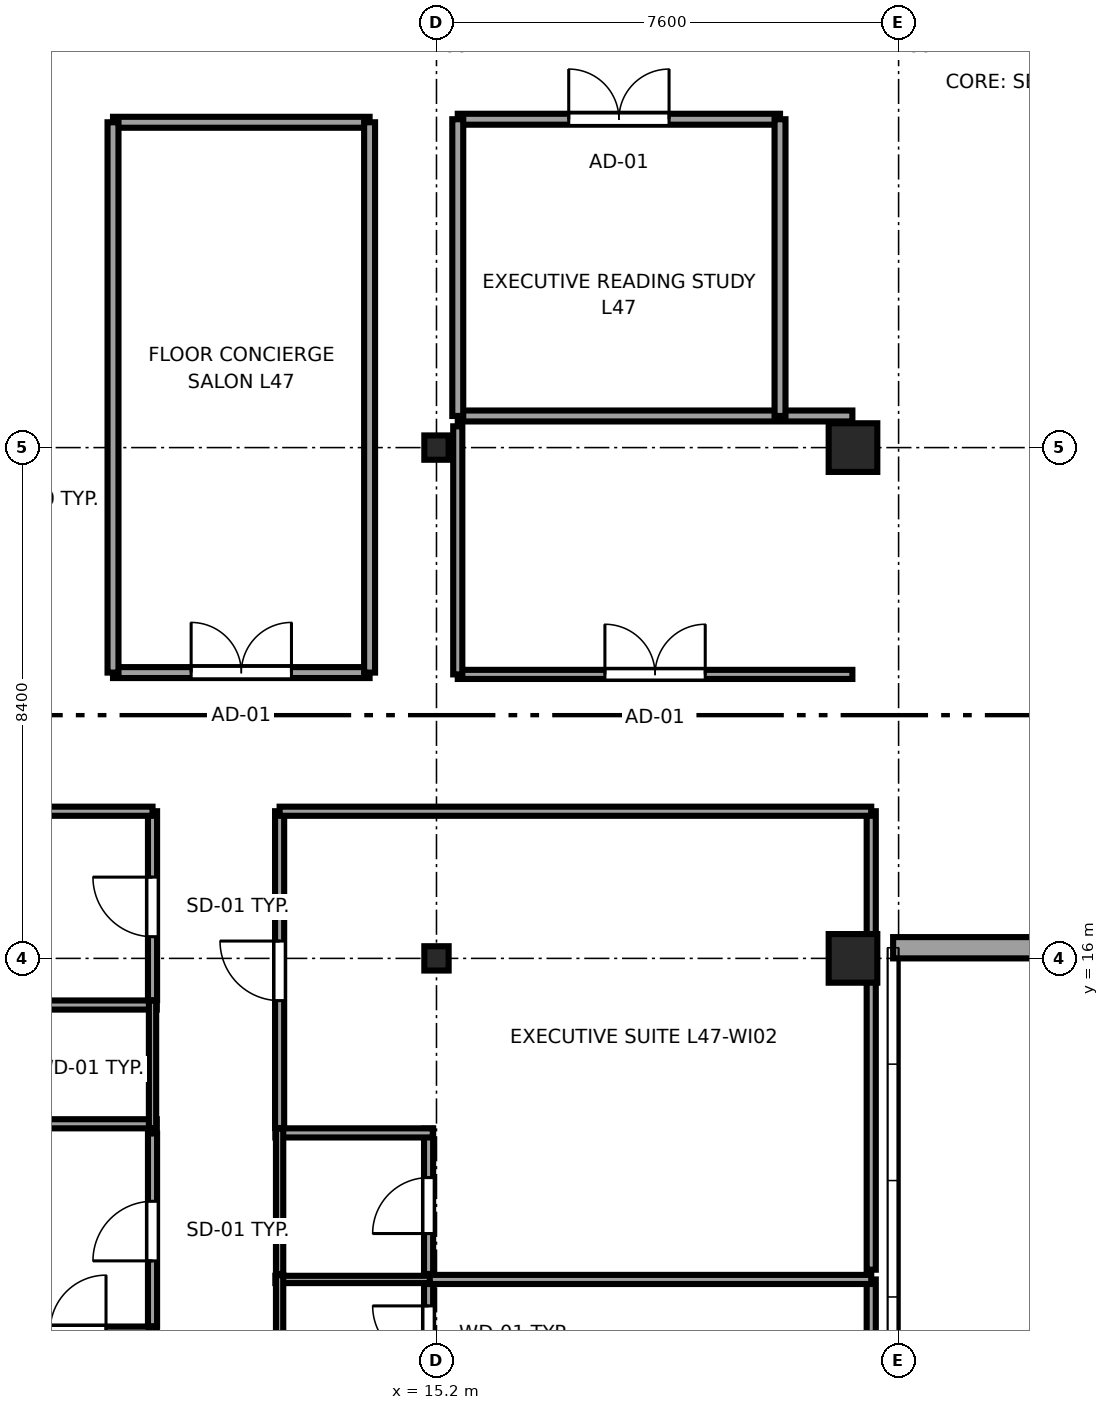
"""IFC4 building model, lengths in metres.
Left out: names, types, materials, properties, quantities, classifications, styles, units other than length and angle.
Written with IfcOpenShell. Run it as: python <this file> out.ifc"""

import sys

from ifc_helpers import new_model, si_unit, direction, frame, frame_2d, origin, origin_2d, place, context, subcontext, project, spatial, rectangle, i_section, extrude, source, transform, mapped, element, fill, save


model = new_model("IFC4")
c1 = context("Model", 3, precision=1e-05, world=origin(), true_north=direction((0.0, 1.0)))
c2 = subcontext(c1, "Body", "Model", "MODEL_VIEW")
j1 = project(units=[si_unit("LENGTHUNIT", "METRE"), si_unit("PLANEANGLEUNIT", "RADIAN")], contexts=[c1])
p1 = place(None, origin())
s1 = spatial("IfcSite", under=j1, at=p1, CompositionType="ELEMENT")
p2 = place(p1, origin())
s2 = spatial("IfcBuilding", under=s1, at=p2, CompositionType="ELEMENT")
p3 = place(p2, frame((0.0, 0.0, 179.0)))
s3 = spatial("IfcBuildingStorey", under=s2, at=p3, CompositionType="ELEMENT", Elevation=179.0)
m1 = source(origin(), c2, "Body", "SweptSolid", [
    extrude(i_section(OverallWidth=0.4, OverallDepth=0.4, WebThickness=0.02, FlangeThickness=0.035, at=origin_2d()), origin(), (0.0, 0.0, 1.0), 3.55),
])
for number, where, z_axis, x_axis in (
    (1, (15.2, 16.0, 0.0), (0.0, 0.0, 1.0), (1.0, 0.0, 0.0)),
    (2, (15.2, 24.4, 0.0), (0.0, 0.0, 1.0), (1.0, 0.0, 0.0)),
):
    element("IfcColumn", number, at=place(p3, frame(where, z_axis=z_axis, x_axis=x_axis)), inside=s3, PredefinedType="COLUMN", context=c2, shape_type="MappedRepresentation", body=[
        mapped(m1, transform((0.0, 0.0, 0.0), x_axis=(1.0, 0.0, 0.0), y_axis=(0.0, 1.0, 0.0), z_axis=(0.0, 0.0, 1.0), scale=1.0)),
    ])
m2 = source(origin(), c2, "Body", "SweptSolid", [
    extrude(rectangle(XDim=0.8, YDim=0.8, at=origin_2d()), origin(), (0.0, 0.0, 1.0), 3.55),
])
for number, where, z_axis, x_axis in (
    (3, (22.05, 16.0, 0.0), (0.0, 0.0, 1.0), (1.0, 0.0, 0.0)),
    (4, (22.05, 24.4, 0.0), (0.0, 0.0, 1.0), (1.0, 0.0, 0.0)),
):
    element("IfcColumn", number, at=place(p3, frame(where, z_axis=z_axis, x_axis=x_axis)), inside=s3, PredefinedType="COLUMN", context=c2, shape_type="MappedRepresentation", body=[
        mapped(m2, transform((0.0, 0.0, 0.0), x_axis=(1.0, 0.0, 0.0), y_axis=(0.0, 1.0, 0.0), z_axis=(0.0, 0.0, 1.0), scale=1.0)),
    ])
p4 = place(p3, frame((22.71, 16.175, 0.0), z_axis=(0.0, 0.0, 1.0), x_axis=(1.0, 0.0, 0.0)))
e5 = element("IfcWall", 5, at=p4, inside=s3, PredefinedType="SOLIDWALL", context=c2, shape_type="SweptSolid", body=[
    extrude(rectangle(XDim=11.58, YDim=0.35, at=frame_2d((5.79, 0.0))), origin(), (0.0, 0.0, 1.0), 2.638),
])
p5 = place(p4, frame((2.52, 0.0, 0.62)))
e6 = element("IfcOpeningElement", 6, at=p5, cuts=e5, PredefinedType="OPENING", context=c2, shape_type="SweptSolid", body=[
    extrude(rectangle(XDim=1.35, YDim=1.6, at=frame_2d((0.675, 0.8))), frame((0.0, 0.185, 0.0), z_axis=(0.0, -1.0, 0.0), x_axis=(1.0, 0.0, 0.0)), (0.0, 0.0, 1.0), 0.37),
])
p6 = place(p4, frame((7.71, 0.0, 0.62)))
e7 = element("IfcOpeningElement", 7, at=p6, cuts=e5, PredefinedType="OPENING", context=c2, shape_type="SweptSolid", body=[
    extrude(rectangle(XDim=1.35, YDim=1.6, at=frame_2d((0.675, 0.8))), frame((0.0, 0.185, 0.0), z_axis=(0.0, -1.0, 0.0), x_axis=(1.0, 0.0, 0.0)), (0.0, 0.0, 1.0), 0.37),
])
p7 = place(p3, frame((8.01, 9.871, 0.0), z_axis=(0.0, 0.0, 1.0), x_axis=(1.0, 0.0, 0.0)))
e8 = element("IfcWall", 8, at=p7, inside=s3, PredefinedType="PARTITIONING", context=c2, shape_type="SweptSolid", body=[
    extrude(rectangle(XDim=2.59, YDim=0.15, at=frame_2d((1.295, 0.0))), origin(), (0.0, 0.0, 1.0), 3.25),
])
p8 = place(p7, frame((0.835, 0.0, 0.0)))
e9 = element("IfcOpeningElement", 9, at=p8, cuts=e8, PredefinedType="OPENING", context=c2, shape_type="SweptSolid", body=[
    extrude(rectangle(XDim=0.92, YDim=2.01, at=frame_2d((0.46, 1.005))), frame((0.0, 0.085, 0.0), z_axis=(0.0, -1.0, 0.0), x_axis=(1.0, 0.0, 0.0)), (0.0, 0.0, 1.0), 0.17),
])
p9 = place(p3, frame((10.53, 7.81, 0.0), z_axis=(0.0, 0.0, 1.0), x_axis=(0.0, 1.0, 0.0)))
e10 = element("IfcWall", 10, at=p9, inside=s3, PredefinedType="PLUMBINGWALL", context=c2, shape_type="SweptSolid", body=[
    extrude(rectangle(XDim=2.131, YDim=0.12, at=frame_2d((1.065, 0.0))), origin(), (0.0, 0.0, 1.0), 3.25),
])
p10 = place(p3, frame((3.005, 13.28, 0.0), z_axis=(0.0, 0.0, 1.0), x_axis=(1.0, 0.0, 0.0)))
e11 = element("IfcWall", 11, at=p10, inside=s3, PredefinedType="PARTITIONING", context=c2, shape_type="SweptSolid", body=[
    extrude(rectangle(XDim=7.595, YDim=0.15, at=frame_2d((3.798, 0.0))), origin(), (0.0, 0.0, 1.0), 3.25),
])
p11 = place(p3, frame((8.01, 15.233, 0.0), z_axis=(0.0, 0.0, 1.0), x_axis=(1.0, 0.0, 0.0)))
e12 = element("IfcWall", 12, at=p11, inside=s3, PredefinedType="PARTITIONING", context=c2, shape_type="SweptSolid", body=[
    extrude(rectangle(XDim=2.59, YDim=0.15, at=frame_2d((1.295, 0.0))), origin(), (0.0, 0.0, 1.0), 3.25),
])
p12 = place(p3, frame((10.53, 13.21, 0.0), z_axis=(0.0, 0.0, 1.0), x_axis=(0.0, 1.0, 0.0)))
e13 = element("IfcWall", 13, at=p12, inside=s3, PredefinedType="PLUMBINGWALL", context=c2, shape_type="SweptSolid", body=[
    extrude(rectangle(XDim=2.093, YDim=0.12, at=frame_2d((1.046, 0.0))), origin(), (0.0, 0.0, 1.0), 3.25),
])
p13 = place(p3, frame((15.07, 8.4, 0.0), z_axis=(0.0, 0.0, 1.0), x_axis=(0.0, 1.0, 0.0)))
e14 = element("IfcWall", 14, at=p13, inside=s3, PredefinedType="PARTITIONING", context=c2, shape_type="SweptSolid", body=[
    extrude(rectangle(XDim=2.39, YDim=0.15, at=frame_2d((1.195, 0.0))), origin(), (0.0, 0.0, 1.0), 2.707),
])
p14 = place(p13, frame((0.965, 0.0, 0.0)))
e15 = element("IfcOpeningElement", 15, at=p14, cuts=e14, PredefinedType="OPENING", context=c2, shape_type="SweptSolid", body=[
    extrude(rectangle(XDim=0.92, YDim=2.01, at=frame_2d((0.46, 1.005))), frame((0.0, 0.085, 0.0), z_axis=(0.0, -1.0, 0.0), x_axis=(1.0, 0.0, 0.0)), (0.0, 0.0, 1.0), 0.17),
])
p15 = place(p3, frame((12.55, 10.72, 0.0), z_axis=(0.0, 0.0, 1.0), x_axis=(1.0, 0.0, 0.0)))
e16 = element("IfcWall", 16, at=p15, inside=s3, PredefinedType="PLUMBINGWALL", context=c2, shape_type="SweptSolid", body=[
    extrude(rectangle(XDim=2.59, YDim=0.12, at=frame_2d((1.295, 0.0))), origin(), (0.0, 0.0, 1.0), 3.25),
])
p16 = place(p3, frame((12.62, 8.4, 0.0), z_axis=(0.0, 0.0, 1.0), x_axis=(0.0, 1.0, 0.0)))
e17 = element("IfcWall", 17, at=p16, inside=s3, PredefinedType="PLUMBINGWALL", context=c2, shape_type="SweptSolid", body=[
    extrude(rectangle(XDim=2.39, YDim=0.12, at=frame_2d((1.195, 0.0))), origin(), (0.0, 0.0, 1.0), 3.25),
])
p17 = place(p3, frame((15.07, 10.81, 0.0), z_axis=(0.0, 0.0, 1.0), x_axis=(0.0, 1.0, 0.0)))
e18 = element("IfcWall", 18, at=p17, inside=s3, PredefinedType="PARTITIONING", context=c2, shape_type="SweptSolid", body=[
    extrude(rectangle(XDim=2.39, YDim=0.15, at=frame_2d((1.195, 0.0))), origin(), (0.0, 0.0, 1.0), 2.707),
])
p18 = place(p17, frame((0.665, 0.0, 0.0)))
e19 = element("IfcOpeningElement", 19, at=p18, cuts=e18, PredefinedType="OPENING", context=c2, shape_type="SweptSolid", body=[
    extrude(rectangle(XDim=0.92, YDim=2.01, at=frame_2d((0.46, 1.005))), frame((0.0, 0.085, 0.0), z_axis=(0.0, -1.0, 0.0), x_axis=(1.0, 0.0, 0.0)), (0.0, 0.0, 1.0), 0.17),
])
p19 = place(p3, frame((12.55, 13.13, 0.0), z_axis=(0.0, 0.0, 1.0), x_axis=(1.0, 0.0, 0.0)))
e20 = element("IfcWall", 20, at=p19, inside=s3, PredefinedType="PARTITIONING", context=c2, shape_type="SweptSolid", body=[
    extrude(rectangle(XDim=2.59, YDim=0.15, at=frame_2d((1.295, 0.0))), origin(), (0.0, 0.0, 1.0), 3.25),
])
p20 = place(p3, frame((12.62, 10.81, 0.0), z_axis=(0.0, 0.0, 1.0), x_axis=(0.0, 1.0, 0.0)))
e21 = element("IfcWall", 21, at=p20, inside=s3, PredefinedType="PLUMBINGWALL", context=c2, shape_type="SweptSolid", body=[
    extrude(rectangle(XDim=2.39, YDim=0.12, at=frame_2d((1.195, 0.0))), origin(), (0.0, 0.0, 1.0), 3.25),
])
p21 = place(p3, frame((10.53, 9.951, 0.0), z_axis=(0.0, 0.0, 1.0), x_axis=(0.0, 1.0, 0.0)))
e22 = element("IfcWall", 22, at=p21, inside=s3, PredefinedType="PARTITIONING", context=c2, shape_type="SweptSolid", body=[
    extrude(rectangle(XDim=3.169, YDim=0.15, at=frame_2d((1.584, 0.0))), origin(), (0.0, 0.0, 1.0), 3.25),
])
p22 = place(p21, frame((1.074, 0.0, 0.0)))
e23 = element("IfcOpeningElement", 23, at=p22, cuts=e22, PredefinedType="OPENING", context=c2, shape_type="SweptSolid", body=[
    extrude(rectangle(XDim=0.98, YDim=2.12, at=frame_2d((0.49, 1.06))), frame((0.0, 0.085, 0.0), z_axis=(0.0, -1.0, 0.0), x_axis=(1.0, 0.0, 0.0)), (0.0, 0.0, 1.0), 0.17),
])
p23 = place(p3, frame((10.53, 15.313, 0.0), z_axis=(0.0, 0.0, 1.0), x_axis=(0.0, 1.0, 0.0)))
e24 = element("IfcWall", 24, at=p23, inside=s3, PredefinedType="PARTITIONING", context=c2, shape_type="SweptSolid", body=[
    extrude(rectangle(XDim=3.107, YDim=0.15, at=frame_2d((1.553, 0.0))), origin(), (0.0, 0.0, 1.0), 3.25),
])
p24 = place(p23, frame((1.043, 0.0, 0.0)))
e25 = element("IfcOpeningElement", 25, at=p24, cuts=e24, PredefinedType="OPENING", context=c2, shape_type="SweptSolid", body=[
    extrude(rectangle(XDim=0.98, YDim=2.12, at=frame_2d((0.49, 1.06))), frame((0.0, 0.085, 0.0), z_axis=(0.0, -1.0, 0.0), x_axis=(1.0, 0.0, 0.0)), (0.0, 0.0, 1.0), 0.17),
])
p25 = place(p3, frame((3.005, 18.42, 0.0), z_axis=(0.0, 0.0, 1.0), x_axis=(1.0, 0.0, 0.0)))
e26 = element("IfcWall", 26, at=p25, inside=s3, PredefinedType="PARTITIONING", context=c2, shape_type="SweptSolid", body=[
    extrude(rectangle(XDim=7.525, YDim=0.15, at=frame_2d((3.763, 0.0))), origin(), (0.0, 0.0, 1.0), 3.25),
])
p26 = place(p3, frame((22.35, 3.005, 0.0), z_axis=(0.0, 0.0, 1.0), x_axis=(0.0, 1.0, 0.0)))
e27 = element("IfcWall", 27, at=p26, inside=s3, PredefinedType="PARTITIONING", context=c2, shape_type="SweptSolid", body=[
    extrude(rectangle(XDim=7.715, YDim=0.15, at=frame_2d((3.857, 0.0))), origin(), (0.0, 0.0, 1.0), 3.25),
])
p27 = place(p3, frame((15.09, 10.72, 0.0), z_axis=(0.0, 0.0, 1.0), x_axis=(1.0, 0.0, 0.0)))
e28 = element("IfcWall", 28, at=p27, inside=s3, PredefinedType="PARTITIONING", context=c2, shape_type="SweptSolid", body=[
    extrude(rectangle(XDim=7.26, YDim=0.15, at=frame_2d((3.63, 0.0))), origin(), (0.0, 0.0, 1.0), 3.25),
])
p28 = place(p3, frame((12.62, 13.21, 0.0), z_axis=(0.0, 0.0, 1.0), x_axis=(0.0, 1.0, 0.0)))
e29 = element("IfcWall", 29, at=p28, inside=s3, PredefinedType="PARTITIONING", context=c2, shape_type="SweptSolid", body=[
    extrude(rectangle(XDim=5.21, YDim=0.15, at=frame_2d((2.605, 0.0))), origin(), (0.0, 0.0, 1.0), 3.25),
])
p29 = place(p28, frame((2.095, 0.0, 0.0)))
e30 = element("IfcOpeningElement", 30, at=p29, cuts=e29, PredefinedType="OPENING", context=c2, shape_type="SweptSolid", body=[
    extrude(rectangle(XDim=0.98, YDim=2.12, at=frame_2d((0.49, 1.06))), frame((0.0, 0.085, 0.0), z_axis=(0.0, -1.0, 0.0), x_axis=(1.0, 0.0, 0.0)), (0.0, 0.0, 1.0), 0.17),
])
p30 = place(p3, frame((22.35, 10.88, 0.0), z_axis=(0.0, 0.0, 1.0), x_axis=(0.0, 1.0, 0.0)))
e31 = element("IfcWall", 31, at=p30, inside=s3, PredefinedType="PARTITIONING", context=c2, shape_type="SweptSolid", body=[
    extrude(rectangle(XDim=7.54, YDim=0.15, at=frame_2d((3.77, 0.0))), origin(), (0.0, 0.0, 1.0), 3.25),
])
p31 = place(p3, frame((12.62, 18.42, 0.0), z_axis=(0.0, 0.0, 1.0), x_axis=(1.0, 0.0, 0.0)))
e32 = element("IfcWall", 32, at=p31, inside=s3, PredefinedType="PARTITIONING", context=c2, shape_type="SweptSolid", body=[
    extrude(rectangle(XDim=9.73, YDim=0.15, at=frame_2d((4.865, 0.0))), origin(), (0.0, 0.0, 1.0), 3.25),
])
p32 = place(p3, frame((9.88, 20.7, 0.0), z_axis=(0.0, 0.0, 1.0), x_axis=(1.0, 0.0, 0.0)))
e33 = element("IfcWall", 33, at=p32, inside=s3, PredefinedType="PARTITIONING", context=c2, shape_type="SweptSolid", body=[
    extrude(rectangle(XDim=4.22, YDim=0.18, at=frame_2d((2.11, 0.0))), origin(), (0.0, 0.0, 1.0), 3.25),
])
p33 = place(p32, frame((1.285, 0.0, 0.0)))
e34 = element("IfcOpeningElement", 34, at=p33, cuts=e33, PredefinedType="OPENING", context=c2, shape_type="SweptSolid", body=[
    extrude(rectangle(XDim=1.65, YDim=2.15, at=frame_2d((0.825, 1.075))), frame((0.0, 0.1, 0.0), z_axis=(0.0, -1.0, 0.0), x_axis=(1.0, 0.0, 0.0)), (0.0, 0.0, 1.0), 0.2),
])
p34 = place(p3, frame((9.88, 29.75, 0.0), z_axis=(0.0, 0.0, 1.0), x_axis=(1.0, 0.0, 0.0)))
e35 = element("IfcWall", 35, at=p34, inside=s3, PredefinedType="PARTITIONING", context=c2, shape_type="SweptSolid", body=[
    extrude(rectangle(XDim=4.22, YDim=0.18, at=frame_2d((2.11, 0.0))), origin(), (0.0, 0.0, 1.0), 3.25),
])
for number, where, z_axis, x_axis in (
    (36, (9.88, 20.7, 0.0), (0.0, 0.0, 1.0), (0.0, 1.0, 0.0)),
    (37, (14.1, 20.7, 0.0), (0.0, 0.0, 1.0), (0.0, 1.0, 0.0)),
):
    element("IfcWall", number, at=place(p3, frame(where, z_axis=z_axis, x_axis=x_axis)), inside=s3, PredefinedType="PARTITIONING", context=c2, shape_type="SweptSolid", body=[
        extrude(rectangle(XDim=9.05, YDim=0.18, at=frame_2d((4.525, 0.0))), origin(), (0.0, 0.0, 1.0), 3.25),
    ])
p35 = place(p3, frame((15.55, 24.92, 0.0), z_axis=(0.0, 0.0, 1.0), x_axis=(1.0, 0.0, 0.0)))
e38 = element("IfcWall", 38, at=p35, inside=s3, PredefinedType="PARTITIONING", context=c2, shape_type="SweptSolid", body=[
    extrude(rectangle(XDim=6.49, YDim=0.18, at=frame_2d((3.245, 0.0))), origin(), (0.0, 0.0, 1.0), 3.25),
])
p36 = place(p3, frame((15.55, 29.8, 0.0), z_axis=(0.0, 0.0, 1.0), x_axis=(1.0, 0.0, 0.0)))
e39 = element("IfcWall", 39, at=p36, inside=s3, PredefinedType="PARTITIONING", context=c2, shape_type="SweptSolid", body=[
    extrude(rectangle(XDim=5.3, YDim=0.18, at=frame_2d((2.65, 0.0))), origin(), (0.0, 0.0, 1.0), 3.25),
])
p37 = place(p36, frame((1.825, 0.0, 0.0)))
e40 = element("IfcOpeningElement", 40, at=p37, cuts=e39, PredefinedType="OPENING", context=c2, shape_type="SweptSolid", body=[
    extrude(rectangle(XDim=1.65, YDim=2.15, at=frame_2d((0.825, 1.075))), frame((0.0, 0.1, 0.0), z_axis=(0.0, -1.0, 0.0), x_axis=(1.0, 0.0, 0.0)), (0.0, 0.0, 1.0), 0.2),
])
for number, where, z_axis, x_axis in (
    (41, (15.55, 24.92, 0.0), (0.0, 0.0, 1.0), (0.0, 1.0, 0.0)),
    (42, (20.85, 24.92, 0.0), (0.0, 0.0, 1.0), (0.0, 1.0, 0.0)),
):
    element("IfcWall", number, at=place(p3, frame(where, z_axis=z_axis, x_axis=x_axis)), inside=s3, PredefinedType="PARTITIONING", context=c2, shape_type="SweptSolid", body=[
        extrude(rectangle(XDim=4.88, YDim=0.18, at=frame_2d((2.44, 0.0))), origin(), (0.0, 0.0, 1.0), 3.25),
    ])
p38 = place(p3, frame((15.55, 20.67, 0.0), z_axis=(0.0, 0.0, 1.0), x_axis=(1.0, 0.0, 0.0)))
e43 = element("IfcWall", 43, at=p38, inside=s3, PredefinedType="PARTITIONING", context=c2, shape_type="SweptSolid", body=[
    extrude(rectangle(XDim=6.49, YDim=0.15, at=frame_2d((3.245, 0.0))), origin(), (0.0, 0.0, 1.0), 3.25),
])
p39 = place(p38, frame((2.42, 0.0, 0.0)))
e44 = element("IfcOpeningElement", 44, at=p39, cuts=e43, PredefinedType="OPENING", context=c2, shape_type="SweptSolid", body=[
    extrude(rectangle(XDim=1.65, YDim=2.15, at=frame_2d((0.825, 1.075))), frame((0.0, 0.085, 0.0), z_axis=(0.0, -1.0, 0.0), x_axis=(1.0, 0.0, 0.0)), (0.0, 0.0, 1.0), 0.17),
])
p40 = place(p3, frame((15.55, 20.67, 0.0), z_axis=(0.0, 0.0, 1.0), x_axis=(0.0, 1.0, 0.0)))
e45 = element("IfcWall", 45, at=p40, inside=s3, PredefinedType="PARTITIONING", context=c2, shape_type="SweptSolid", body=[
    extrude(rectangle(XDim=4.08, YDim=0.15, at=frame_2d((2.04, 0.0))), origin(), (0.0, 0.0, 1.0), 3.25),
])
m3 = source(origin(), c2, "Body", "SweptSolid", [
    extrude(rectangle(XDim=0.92, YDim=2.01, at=frame_2d((0.46, 1.005))), frame((0.0, 0.025, 0.0), z_axis=(0.0, -1.0, 0.0), x_axis=(1.0, 0.0, 0.0)), (0.0, 0.0, 1.0), 0.05),
])
p41 = place(p8, origin())
e46 = element("IfcDoor", 46, at=p41, inside=s3, OperationType="SINGLE_SWING_RIGHT", PredefinedType="DOOR", context=c2, shape_type="MappedRepresentation", body=[
    mapped(m3, transform((0.0, 0.0, 0.0), x_axis=(1.0, 0.0, 0.0), y_axis=(0.0, 1.0, 0.0), z_axis=(0.0, 0.0, 1.0), scale=1.0)),
])
fill(e9, e46)
p42 = place(p14, origin())
e47 = element("IfcDoor", 47, at=p42, inside=s3, OperationType="SINGLE_SWING_RIGHT", PredefinedType="DOOR", context=c2, shape_type="MappedRepresentation", body=[
    mapped(m3, transform((0.0, 0.0, 0.0), x_axis=(1.0, 0.0, 0.0), y_axis=(0.0, 1.0, 0.0), z_axis=(0.0, 0.0, 1.0), scale=1.0)),
])
fill(e15, e47)
p43 = place(p18, origin())
e48 = element("IfcDoor", 48, at=p43, inside=s3, OperationType="SINGLE_SWING_LEFT", PredefinedType="DOOR", context=c2, shape_type="MappedRepresentation", body=[
    mapped(m3, transform((0.0, 0.0, 0.0), x_axis=(1.0, 0.0, 0.0), y_axis=(0.0, 1.0, 0.0), z_axis=(0.0, 0.0, 1.0), scale=1.0)),
])
fill(e19, e48)
m4 = source(origin(), c2, "Body", "SweptSolid", [
    extrude(rectangle(XDim=0.98, YDim=2.12, at=frame_2d((0.49, 1.06))), frame((0.0, 0.025, 0.0), z_axis=(0.0, -1.0, 0.0), x_axis=(1.0, 0.0, 0.0)), (0.0, 0.0, 1.0), 0.05),
])
p44 = place(p22, origin())
e49 = element("IfcDoor", 49, at=p44, inside=s3, OperationType="SINGLE_SWING_LEFT", PredefinedType="DOOR", context=c2, shape_type="MappedRepresentation", body=[
    mapped(m4, transform((0.0, 0.0, 0.0), x_axis=(1.0, 0.0, 0.0), y_axis=(0.0, 1.0, 0.0), z_axis=(0.0, 0.0, 1.0), scale=1.0)),
])
fill(e23, e49)
p45 = place(p24, origin())
e50 = element("IfcDoor", 50, at=p45, inside=s3, OperationType="SINGLE_SWING_RIGHT", PredefinedType="DOOR", context=c2, shape_type="MappedRepresentation", body=[
    mapped(m4, transform((0.0, 0.0, 0.0), x_axis=(1.0, 0.0, 0.0), y_axis=(0.0, 1.0, 0.0), z_axis=(0.0, 0.0, 1.0), scale=1.0)),
])
fill(e25, e50)
p46 = place(p29, origin())
e51 = element("IfcDoor", 51, at=p46, inside=s3, OperationType="SINGLE_SWING_RIGHT", PredefinedType="DOOR", context=c2, shape_type="MappedRepresentation", body=[
    mapped(m4, transform((0.0, 0.0, 0.0), x_axis=(1.0, 0.0, 0.0), y_axis=(0.0, 1.0, 0.0), z_axis=(0.0, 0.0, 1.0), scale=1.0)),
])
fill(e30, e51)
m5 = source(origin(), c2, "Body", "SweptSolid", [
    extrude(rectangle(XDim=1.65, YDim=2.15, at=frame_2d((0.825, 1.075))), frame((0.0, 0.025, 0.0), z_axis=(0.0, -1.0, 0.0), x_axis=(1.0, 0.0, 0.0)), (0.0, 0.0, 1.0), 0.05),
])
p47 = place(p33, origin())
e52 = element("IfcDoor", 52, at=p47, inside=s3, OperationType="DOUBLE_DOOR_SINGLE_SWING", PredefinedType="DOOR", context=c2, shape_type="MappedRepresentation", body=[
    mapped(m5, transform((0.0, 0.0, 0.0), x_axis=(1.0, 0.0, 0.0), y_axis=(0.0, 1.0, 0.0), z_axis=(0.0, 0.0, 1.0), scale=1.0)),
])
fill(e34, e52)
p48 = place(p37, origin())
e53 = element("IfcDoor", 53, at=p48, inside=s3, OperationType="DOUBLE_DOOR_SINGLE_SWING", PredefinedType="DOOR", context=c2, shape_type="MappedRepresentation", body=[
    mapped(m5, transform((0.0, 0.0, 0.0), x_axis=(1.0, 0.0, 0.0), y_axis=(0.0, 1.0, 0.0), z_axis=(0.0, 0.0, 1.0), scale=1.0)),
])
fill(e40, e53)
p49 = place(p39, origin())
e54 = element("IfcDoor", 54, at=p49, inside=s3, OperationType="DOUBLE_DOOR_SINGLE_SWING", PredefinedType="DOOR", context=c2, shape_type="MappedRepresentation", body=[
    mapped(m5, transform((0.0, 0.0, 0.0), x_axis=(1.0, 0.0, 0.0), y_axis=(0.0, 1.0, 0.0), z_axis=(0.0, 0.0, 1.0), scale=1.0)),
])
fill(e44, e54)
save(model, sys.argv[1])
